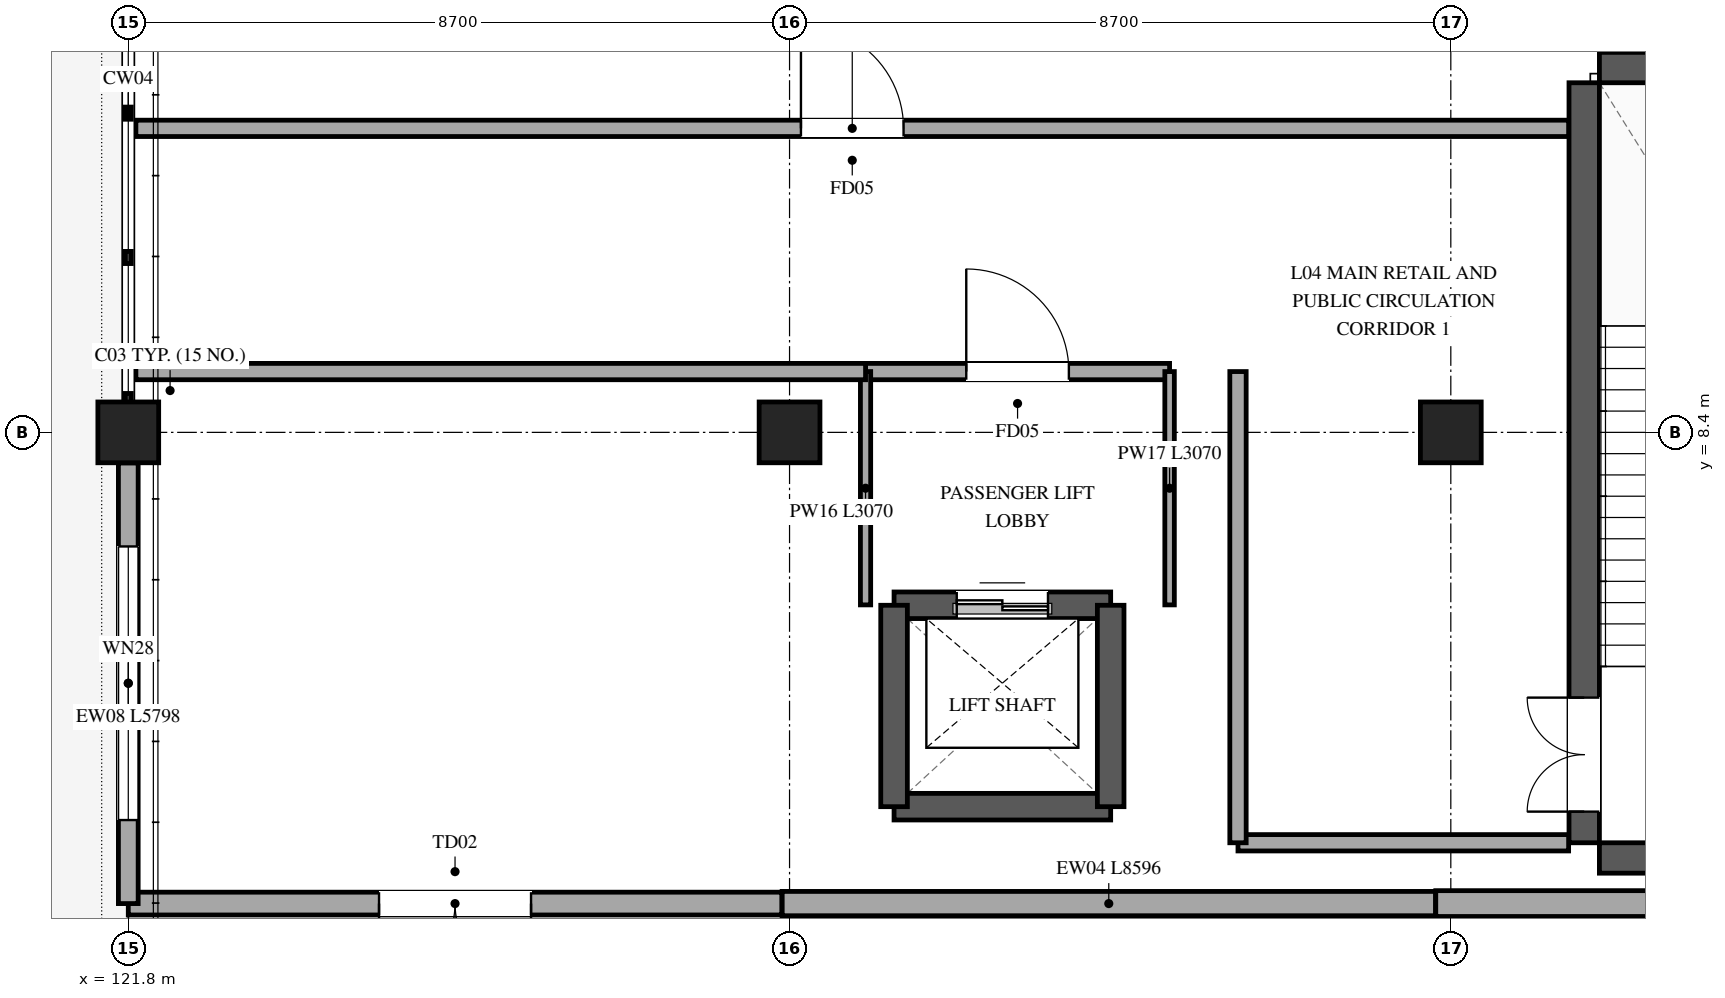
"""IFC4 building model, lengths in metres.
Left out: names, types, materials, properties, quantities, classifications, styles, units other than length and angle.
Written with IfcOpenShell. Run it as: python <this file> out.ifc"""

import sys

from ifc_helpers import new_model, si_unit, direction, frame, frame_2d, origin, origin_2d, place, context, subcontext, project, spatial, rectangle, extrude, element, fill, save


model = new_model("IFC4")
c1 = context("Model", 3, precision=1e-05, world=origin(), true_north=direction((0.0, 1.0)))
c2 = subcontext(c1, "Body", "Model", "MODEL_VIEW")
j1 = project(units=[si_unit("LENGTHUNIT", "METRE"), si_unit("PLANEANGLEUNIT", "RADIAN")], contexts=[c1])
p1 = place(None, origin())
s1 = spatial("IfcSite", under=j1, at=p1, CompositionType="ELEMENT")
p2 = place(p1, origin())
s2 = spatial("IfcBuilding", under=s1, at=p2, CompositionType="ELEMENT")
p3 = place(p2, frame((0.0, 0.0, 16.5)))
s3 = spatial("IfcBuildingStorey", under=s2, at=p3, CompositionType="ELEMENT", Elevation=16.5)
for number, where, z_axis, x_axis in (
    (1, (121.8, 8.4, 0.0), (0.0, 0.0, 1.0), (1.0, 0.0, 0.0)),
    (2, (130.5, 8.4, 0.0), (0.0, 0.0, 1.0), (1.0, 0.0, 0.0)),
    (3, (139.2, 8.4, 0.0), (0.0, 0.0, 1.0), (1.0, 0.0, 0.0)),
):
    element("IfcColumn", number, at=place(p3, frame(where, z_axis=z_axis, x_axis=x_axis)), inside=s3, PredefinedType="COLUMN", context=c2, shape_type="SweptSolid", body=[
        extrude(rectangle(XDim=0.8, YDim=0.8, at=origin_2d()), origin(), (0.0, 0.0, 1.0), 5.1),
    ])
p4 = place(p3, frame((147.6, 2.2, 0.0), z_axis=(0.0, 0.0, 1.0), x_axis=(-1.0, 0.0, 0.0)))
e4 = element("IfcWall", 4, at=p4, inside=s3, PredefinedType="STANDARD", context=c2, shape_type="SweptSolid", body=[
    extrude(rectangle(XDim=8.598, YDim=0.34, at=frame_2d((4.299, 0.0))), origin(), (0.0, 0.0, 1.0), 4.79),
])
p5 = place(p3, frame((138.998, 2.2, 0.0), z_axis=(0.0, 0.0, 1.0), x_axis=(-1.0, 0.0, 0.0)))
e5 = element("IfcWall", 5, at=p5, inside=s3, PredefinedType="STANDARD", context=c2, shape_type="SweptSolid", body=[
    extrude(rectangle(XDim=8.596, YDim=0.32, at=frame_2d((4.298, 0.0))), origin(), (0.0, 0.0, 1.0), 4.79),
])
p6 = place(p3, frame((130.398, 2.2, 0.0), z_axis=(0.0, 0.0, 1.0), x_axis=(-1.0, 0.0, 0.0)))
e6 = element("IfcWall", 6, at=p6, inside=s3, PredefinedType="STANDARD", context=c2, shape_type="SweptSolid", body=[
    extrude(rectangle(XDim=8.598, YDim=0.3, at=frame_2d((4.299, 0.0))), origin(), (0.0, 0.0, 1.0), 4.79),
])
p7 = place(p6, frame((3.299, 0.0, 0.0)))
e7 = element("IfcOpeningElement", 7, at=p7, cuts=e6, PredefinedType="OPENING", context=c2, shape_type="SweptSolid", body=[
    extrude(rectangle(XDim=2.0, YDim=2.25, at=frame_2d((1.0, 1.125))), frame((0.0, 0.16, 0.0), z_axis=(0.0, -1.0, 0.0), x_axis=(1.0, 0.0, 0.0)), (0.0, 0.0, 1.0), 0.32),
])
p8 = place(p3, frame((121.8, 2.2, 0.0), z_axis=(0.0, 0.0, 1.0), x_axis=(0.0, 1.0, 0.0)))
e8 = element("IfcWall", 8, at=p8, inside=s3, PredefinedType="STANDARD", context=c2, shape_type="SweptSolid", body=[
    extrude(rectangle(XDim=5.798, YDim=0.26, at=frame_2d((2.899, 0.0))), origin(), (0.0, 0.0, 1.0), 4.79),
])
p9 = place(p8, frame((1.099, 0.0, 0.85)))
e9 = element("IfcOpeningElement", 9, at=p9, cuts=e8, PredefinedType="OPENING", context=c2, shape_type="SweptSolid", body=[
    extrude(rectangle(XDim=3.6, YDim=1.85, at=frame_2d((1.8, 0.925))), frame((0.0, 0.14, 0.0), z_axis=(0.0, -1.0, 0.0), x_axis=(1.0, 0.0, 0.0)), (0.0, 0.0, 1.0), 0.28),
])
p10 = place(p3, frame((140.955, 3.0, 0.0), z_axis=(0.0, 0.0, 1.0), x_axis=(0.0, 1.0, 0.0)))
e10 = element("IfcWall", 10, at=p10, inside=s3, PredefinedType="SHEAR", context=c2, shape_type="SweptSolid", body=[
    extrude(rectangle(XDim=10.0, YDim=0.4, at=frame_2d((5.0, 0.0))), origin(), (0.0, 0.0, 1.0), 5.1),
])
p11 = place(p10, frame((0.41, 0.0, 0.0)))
e11 = element("IfcOpeningElement", 11, at=p11, cuts=e10, PredefinedType="OPENING", context=c2, shape_type="SweptSolid", body=[
    extrude(rectangle(XDim=1.5, YDim=2.2, at=frame_2d((0.75, 1.1))), frame((0.0, 0.21, 0.0), z_axis=(0.0, -1.0, 0.0), x_axis=(1.0, 0.0, 0.0)), (0.0, 0.0, 1.0), 0.42),
])
for number, where, z_axis, x_axis in (
    (12, (145.945, 2.8, 0.0), (0.0, 0.0, 1.0), (-1.0, 0.0, 0.0)),
    (13, (141.155, 13.2, 0.0), (0.0, 0.0, 1.0), (1.0, 0.0, 0.0)),
):
    element("IfcWall", number, at=place(p3, frame(where, z_axis=z_axis, x_axis=x_axis)), inside=s3, PredefinedType="SHEAR", context=c2, shape_type="SweptSolid", body=[
        extrude(rectangle(XDim=4.79, YDim=0.4, at=frame_2d((2.395, 0.0))), origin(), (0.0, 0.0, 1.0), 5.1),
    ])
p12 = place(p3, frame((131.875, 6.125, 0.0), z_axis=(0.0, 0.0, 1.0), x_axis=(1.0, 0.0, 0.0)))
e14 = element("IfcWall", 14, at=p12, inside=s3, PredefinedType="SHEAR", context=c2, shape_type="SweptSolid", body=[
    extrude(rectangle(XDim=2.85, YDim=0.35, at=frame_2d((1.425, 0.0))), origin(), (0.0, 0.0, 1.0), 5.1),
])
p13 = place(p12, frame((0.825, 0.0, 0.0)))
e15 = element("IfcOpeningElement", 15, at=p13, cuts=e14, PredefinedType="OPENING", context=c2, shape_type="SweptSolid", body=[
    extrude(rectangle(XDim=1.2, YDim=2.2, at=frame_2d((0.6, 1.1))), frame((0.0, 0.185, 0.0), z_axis=(0.0, -1.0, 0.0), x_axis=(1.0, 0.0, 0.0)), (0.0, 0.0, 1.0), 0.37),
])
p14 = place(p3, frame((134.725, 3.475, 0.0), z_axis=(0.0, 0.0, 1.0), x_axis=(-1.0, 0.0, 0.0)))
e16 = element("IfcWall", 16, at=p14, inside=s3, PredefinedType="SHEAR", context=c2, shape_type="SweptSolid", body=[
    extrude(rectangle(XDim=2.85, YDim=0.35, at=frame_2d((1.425, 0.0))), origin(), (0.0, 0.0, 1.0), 5.1),
])
for number, where, z_axis, x_axis in (
    (17, (131.875, 3.475, 0.0), (0.0, 0.0, 1.0), (0.0, 1.0, 0.0)),
    (18, (134.725, 6.125, 0.0), (0.0, 0.0, 1.0), (0.0, -1.0, 0.0)),
):
    element("IfcWall", number, at=place(p3, frame(where, z_axis=z_axis, x_axis=x_axis)), inside=s3, PredefinedType="SHEAR", context=c2, shape_type="SweptSolid", body=[
        extrude(rectangle(XDim=2.65, YDim=0.35, at=frame_2d((1.325, 0.0))), origin(), (0.0, 0.0, 1.0), 5.1),
    ])
p15 = place(p3, frame((131.5, 9.2, 0.0), z_axis=(0.0, 0.0, 1.0), x_axis=(1.0, 0.0, 0.0)))
e19 = element("IfcWall", 19, at=p15, inside=s3, PredefinedType="PARTITIONING", context=c2, shape_type="SweptSolid", body=[
    extrude(rectangle(XDim=4.0, YDim=0.215, at=frame_2d((2.0, 0.0))), origin(), (0.0, 0.0, 1.0), 4.76),
])
p16 = place(p15, frame((1.325, 0.0, 0.0)))
e20 = element("IfcOpeningElement", 20, at=p16, cuts=e19, PredefinedType="OPENING", context=c2, shape_type="SweptSolid", body=[
    extrude(rectangle(XDim=1.35, YDim=2.2, at=frame_2d((0.675, 1.1))), frame((0.0, 0.118, 0.0), z_axis=(0.0, -1.0, 0.0), x_axis=(1.0, 0.0, 0.0)), (0.0, 0.0, 1.0), 0.235),
])
p17 = place(p3, frame((131.5, 6.13, 0.0), z_axis=(0.0, 0.0, 1.0), x_axis=(0.0, 1.0, 0.0)))
e21 = element("IfcWall", 21, at=p17, inside=s3, PredefinedType="PARTITIONING", context=c2, shape_type="SweptSolid", body=[
    extrude(rectangle(XDim=3.07, YDim=0.135, at=frame_2d((1.535, 0.0))), origin(), (0.0, 0.0, 1.0), 4.045),
])
p18 = place(p3, frame((135.5, 9.2, 0.0), z_axis=(0.0, 0.0, 1.0), x_axis=(0.0, -1.0, 0.0)))
e22 = element("IfcWall", 22, at=p18, inside=s3, PredefinedType="PARTITIONING", context=c2, shape_type="SweptSolid", body=[
    extrude(rectangle(XDim=3.07, YDim=0.125, at=frame_2d((1.535, 0.0))), origin(), (0.0, 0.0, 1.0), 4.045),
])
p19 = place(p3, frame((131.5, 9.2, 0.0), z_axis=(0.0, 0.0, 1.0), x_axis=(-1.0, 0.0, 0.0)))
e23 = element("IfcWall", 23, at=p19, inside=s3, PredefinedType="PARTITIONING", context=c2, shape_type="SweptSolid", body=[
    extrude(rectangle(XDim=9.6, YDim=0.215, at=frame_2d((4.8, 0.0))), origin(), (0.0, 0.0, 1.0), 4.045),
])
p20 = place(p3, frame((121.9, 12.4, 0.0), z_axis=(0.0, 0.0, 1.0), x_axis=(1.0, 0.0, 0.0)))
e24 = element("IfcWall", 24, at=p20, inside=s3, PredefinedType="PARTITIONING", context=c2, shape_type="SweptSolid", body=[
    extrude(rectangle(XDim=18.85, YDim=0.215, at=frame_2d((9.425, 0.0))), origin(), (0.0, 0.0, 1.0), 4.045),
])
p21 = place(p20, frame((8.75, 0.0, 0.0)))
e25 = element("IfcOpeningElement", 25, at=p21, cuts=e24, PredefinedType="OPENING", context=c2, shape_type="SweptSolid", body=[
    extrude(rectangle(XDim=1.35, YDim=2.2, at=frame_2d((0.675, 1.1))), frame((0.0, 0.118, 0.0), z_axis=(0.0, -1.0, 0.0), x_axis=(1.0, 0.0, 0.0)), (0.0, 0.0, 1.0), 0.235),
])
p22 = place(p3, frame((140.75, 3.0, 0.0), z_axis=(0.0, 0.0, 1.0), x_axis=(-1.0, 0.0, 0.0)))
e26 = element("IfcWall", 26, at=p22, inside=s3, PredefinedType="PARTITIONING", context=c2, shape_type="SweptSolid", body=[
    extrude(rectangle(XDim=4.35, YDim=0.215, at=frame_2d((2.175, 0.0))), origin(), (0.0, 0.0, 1.0), 4.76),
])
p23 = place(p3, frame((136.4, 3.0, 0.0), z_axis=(0.0, 0.0, 1.0), x_axis=(0.0, 1.0, 0.0)))
e27 = element("IfcWall", 27, at=p23, inside=s3, PredefinedType="PARTITIONING", context=c2, shape_type="SweptSolid", body=[
    extrude(rectangle(XDim=6.2, YDim=0.215, at=frame_2d((3.1, 0.0))), origin(), (0.0, 0.0, 1.0), 4.045),
])
p24 = place(p7, origin())
e28 = element("IfcDoor", 28, at=p24, inside=s3, OperationType="DOUBLE_DOOR_SINGLE_SWING", PredefinedType="DOOR", context=c2, shape_type="SweptSolid", body=[
    extrude(rectangle(XDim=2.0, YDim=2.25, at=frame_2d((1.0, 1.125))), frame((0.0, 0.025, 0.0), z_axis=(0.0, -1.0, 0.0), x_axis=(1.0, 0.0, 0.0)), (0.0, 0.0, 1.0), 0.05),
])
fill(e7, e28)
p25 = place(p9, origin())
e29 = element("IfcWindow", 29, at=p25, inside=s3, PartitioningType="TRIPLE_PANEL_VERTICAL", PredefinedType="WINDOW", context=c2, shape_type="SweptSolid", body=[
    extrude(rectangle(XDim=3.6, YDim=1.85, at=frame_2d((1.8, 0.925))), frame((0.0, 0.03, 0.0), z_axis=(0.0, -1.0, 0.0), x_axis=(1.0, 0.0, 0.0)), (0.0, 0.0, 1.0), 0.06),
])
fill(e9, e29)
p26 = place(p11, origin())
e30 = element("IfcDoor", 30, at=p26, inside=s3, OperationType="DOUBLE_DOOR_SINGLE_SWING", PredefinedType="DOOR", context=c2, shape_type="SweptSolid", body=[
    extrude(rectangle(XDim=1.5, YDim=2.2, at=frame_2d((0.75, 1.1))), frame((0.0, 0.025, 0.0), z_axis=(0.0, -1.0, 0.0), x_axis=(1.0, 0.0, 0.0)), (0.0, 0.0, 1.0), 0.05),
])
fill(e11, e30)
p27 = place(p13, origin())
e31 = element("IfcDoor", 31, at=p27, inside=s3, OperationType="DOUBLE_DOOR_SLIDING", PredefinedType="DOOR", context=c2, shape_type="SweptSolid", body=[
    extrude(rectangle(XDim=1.2, YDim=2.2, at=frame_2d((0.6, 1.1))), frame((0.0, 0.025, 0.0), z_axis=(0.0, -1.0, 0.0), x_axis=(1.0, 0.0, 0.0)), (0.0, 0.0, 1.0), 0.05),
])
fill(e15, e31)
p28 = place(p16, origin())
e32 = element("IfcDoor", 32, at=p28, inside=s3, OperationType="SINGLE_SWING_LEFT", PredefinedType="DOOR", context=c2, shape_type="SweptSolid", body=[
    extrude(rectangle(XDim=1.35, YDim=2.2, at=frame_2d((0.675, 1.1))), frame((0.0, 0.025, 0.0), z_axis=(0.0, -1.0, 0.0), x_axis=(1.0, 0.0, 0.0)), (0.0, 0.0, 1.0), 0.05),
])
fill(e20, e32)
p29 = place(p21, origin())
e33 = element("IfcDoor", 33, at=p29, inside=s3, OperationType="SINGLE_SWING_LEFT", PredefinedType="DOOR", context=c2, shape_type="SweptSolid", body=[
    extrude(rectangle(XDim=1.35, YDim=2.2, at=frame_2d((0.675, 1.1))), frame((0.0, 0.025, 0.0), z_axis=(0.0, -1.0, 0.0), x_axis=(1.0, 0.0, 0.0)), (0.0, 0.0, 1.0), 0.05),
])
fill(e25, e33)
save(model, sys.argv[1])
